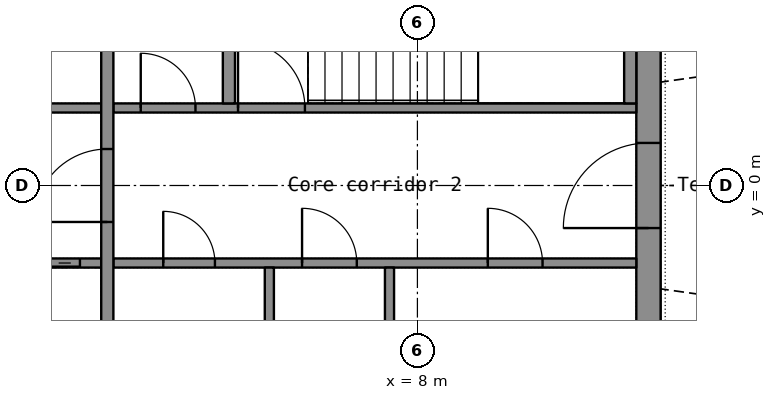
"""IFC4 building model, lengths in metres.
Left out: names, types, materials, properties, quantities, classifications, styles, units other than length and angle.
Written with IfcOpenShell. Run it as: python <this file> out.ifc"""

import sys

from ifc_helpers import new_model, si_unit, direction, frame, frame_2d, origin, place, context, subcontext, project, spatial, rectangle, extrude, element, fill, save


model = new_model("IFC4")
c1 = context("Model", 3, precision=1e-05, world=origin(), true_north=direction((0.0, 1.0)))
c2 = subcontext(c1, "Body", "Model", "MODEL_VIEW")
j1 = project(units=[si_unit("LENGTHUNIT", "METRE"), si_unit("PLANEANGLEUNIT", "RADIAN")], contexts=[c1])
p1 = place(None, origin())
s1 = spatial("IfcSite", under=j1, at=p1, CompositionType="ELEMENT")
p2 = place(p1, origin())
s2 = spatial("IfcBuilding", under=s1, at=p2, CompositionType="ELEMENT")
p3 = place(p2, frame((0.0, 0.0, 246.7)))
s3 = spatial("IfcBuildingStorey", under=s2, at=p3, CompositionType="ELEMENT", Elevation=246.7)
p4 = place(p3, frame((11.8, -7.2, 0.0), z_axis=(0.0, 0.0, 1.0), x_axis=(0.0, 1.0, 0.0)))
e1 = element("IfcWall", 1, at=p4, inside=s3, PredefinedType="SHEAR", context=c2, shape_type="SweptSolid", body=[
    extrude(rectangle(XDim=14.4, YDim=0.4, at=frame_2d((7.2, 0.0))), origin(), (0.0, 0.0, 1.0), 3.3),
])
p5 = place(p4, frame((6.5, 0.0, 0.0)))
e2 = element("IfcOpeningElement", 2, at=p5, cuts=e1, PredefinedType="OPENING", context=c2, shape_type="SweptSolid", body=[
    extrude(rectangle(XDim=1.4, YDim=2.2, at=frame_2d((0.7, 1.1))), frame((0.0, 0.21, 0.0), z_axis=(0.0, -1.0, 0.0), x_axis=(1.0, 0.0, 0.0)), (0.0, 0.0, 1.0), 0.42),
])
p6 = place(p3, frame((-2.8, -1.275, 0.0), z_axis=(0.0, 0.0, 1.0), x_axis=(1.0, 0.0, 0.0)))
e3 = element("IfcWall", 3, at=p6, inside=s3, PredefinedType="SHEAR", context=c2, shape_type="SweptSolid", body=[
    extrude(rectangle(XDim=5.6, YDim=0.15, at=frame_2d((2.8, 0.0))), origin(), (0.0, 0.0, 1.0), 3.3),
])
p7 = place(p6, frame((4.15, 0.0, 0.0)))
e4 = element("IfcOpeningElement", 4, at=p7, cuts=e3, PredefinedType="OPENING", context=c2, shape_type="SweptSolid", body=[
    extrude(rectangle(XDim=1.1, YDim=2.2, at=frame_2d((0.55, 1.1))), frame((0.0, 0.085, 0.0), z_axis=(0.0, -1.0, 0.0), x_axis=(1.0, 0.0, 0.0)), (0.0, 0.0, 1.0), 0.17),
])
p8 = place(p6, frame((1.35, 0.0, 0.0)))
e5 = element("IfcOpeningElement", 5, at=p8, cuts=e3, PredefinedType="OPENING", context=c2, shape_type="SweptSolid", body=[
    extrude(rectangle(XDim=0.9, YDim=2.1, at=frame_2d((0.45, 1.05))), frame((0.0, 0.085, 0.0), z_axis=(0.0, -1.0, 0.0), x_axis=(1.0, 0.0, 0.0)), (0.0, 0.0, 1.0), 0.17),
])
p9 = place(p3, frame((3.0, -1.275, 0.0), z_axis=(0.0, 0.0, 1.0), x_axis=(1.0, 0.0, 0.0)))
e6 = element("IfcWall", 6, at=p9, inside=s3, PredefinedType="PARTITIONING", context=c2, shape_type="SweptSolid", body=[
    extrude(rectangle(XDim=8.6, YDim=0.15, at=frame_2d((4.3, 0.0))), origin(), (0.0, 0.0, 1.0), 3.3),
])
p10 = place(p9, frame((0.82, 0.0, 0.0)))
e7 = element("IfcOpeningElement", 7, at=p10, cuts=e6, PredefinedType="OPENING", context=c2, shape_type="SweptSolid", body=[
    extrude(rectangle(XDim=0.85, YDim=2.1, at=frame_2d((0.425, 1.05))), frame((0.0, 0.085, 0.0), z_axis=(0.0, -1.0, 0.0), x_axis=(1.0, 0.0, 0.0)), (0.0, 0.0, 1.0), 0.17),
])
p11 = place(p9, frame((3.103, 0.0, 0.0)))
e8 = element("IfcOpeningElement", 8, at=p11, cuts=e6, PredefinedType="OPENING", context=c2, shape_type="SweptSolid", body=[
    extrude(rectangle(XDim=0.9, YDim=2.1, at=frame_2d((0.45, 1.05))), frame((0.0, 0.085, 0.0), z_axis=(0.0, -1.0, 0.0), x_axis=(1.0, 0.0, 0.0)), (0.0, 0.0, 1.0), 0.17),
])
p12 = place(p9, frame((6.158, 0.0, 0.0)))
e9 = element("IfcOpeningElement", 9, at=p12, cuts=e6, PredefinedType="OPENING", context=c2, shape_type="SweptSolid", body=[
    extrude(rectangle(XDim=0.9, YDim=2.1, at=frame_2d((0.45, 1.05))), frame((0.0, 0.085, 0.0), z_axis=(0.0, -1.0, 0.0), x_axis=(1.0, 0.0, 0.0)), (0.0, 0.0, 1.0), 0.17),
])
p13 = place(p3, frame((-2.8, 1.275, 0.0), z_axis=(0.0, 0.0, 1.0), x_axis=(1.0, 0.0, 0.0)))
e10 = element("IfcWall", 10, at=p13, inside=s3, PredefinedType="SHEAR", context=c2, shape_type="SweptSolid", body=[
    extrude(rectangle(XDim=5.6, YDim=0.15, at=frame_2d((2.8, 0.0))), origin(), (0.0, 0.0, 1.0), 3.3),
])
p14 = place(p13, frame((0.35, 0.0, 0.0)))
e11 = element("IfcOpeningElement", 11, at=p14, cuts=e10, PredefinedType="OPENING", context=c2, shape_type="SweptSolid", body=[
    extrude(rectangle(XDim=1.1, YDim=2.2, at=frame_2d((0.55, 1.1))), frame((0.0, 0.085, 0.0), z_axis=(0.0, -1.0, 0.0), x_axis=(1.0, 0.0, 0.0)), (0.0, 0.0, 1.0), 0.17),
])
p15 = place(p13, frame((3.35, 0.0, 0.0)))
e12 = element("IfcOpeningElement", 12, at=p15, cuts=e10, PredefinedType="OPENING", context=c2, shape_type="SweptSolid", body=[
    extrude(rectangle(XDim=0.9, YDim=2.1, at=frame_2d((0.45, 1.05))), frame((0.0, 0.085, 0.0), z_axis=(0.0, -1.0, 0.0), x_axis=(1.0, 0.0, 0.0)), (0.0, 0.0, 1.0), 0.17),
])
p16 = place(p3, frame((3.0, 1.275, 0.0), z_axis=(0.0, 0.0, 1.0), x_axis=(1.0, 0.0, 0.0)))
e13 = element("IfcWall", 13, at=p16, inside=s3, PredefinedType="SHEAR", context=c2, shape_type="SweptSolid", body=[
    extrude(rectangle(XDim=8.6, YDim=0.15, at=frame_2d((4.3, 0.0))), origin(), (0.0, 0.0, 1.0), 3.3),
])
p17 = place(p16, frame((2.05, 0.0, 0.0)))
e14 = element("IfcOpeningElement", 14, at=p17, cuts=e13, PredefinedType="OPENING", context=c2, shape_type="SweptSolid", body=[
    extrude(rectangle(XDim=1.1, YDim=2.15, at=frame_2d((0.55, 1.075))), frame((0.0, 0.085, 0.0), z_axis=(0.0, -1.0, 0.0), x_axis=(1.0, 0.0, 0.0)), (0.0, 0.0, 1.0), 0.17),
])
p18 = place(p16, frame((0.45, 0.0, 0.0)))
e15 = element("IfcOpeningElement", 15, at=p18, cuts=e13, PredefinedType="OPENING", context=c2, shape_type="SweptSolid", body=[
    extrude(rectangle(XDim=0.9, YDim=2.1, at=frame_2d((0.45, 1.05))), frame((0.0, 0.085, 0.0), z_axis=(0.0, -1.0, 0.0), x_axis=(1.0, 0.0, 0.0)), (0.0, 0.0, 1.0), 0.17),
])
p19 = place(p3, frame((2.9, -3.7, 0.0), z_axis=(0.0, 0.0, 1.0), x_axis=(0.0, 1.0, 0.0)))
e16 = element("IfcWall", 16, at=p19, inside=s3, PredefinedType="SHEAR", context=c2, shape_type="SweptSolid", body=[
    extrude(rectangle(XDim=7.4, YDim=0.2, at=frame_2d((3.7, 0.0))), origin(), (0.0, 0.0, 1.0), 3.3),
])
p20 = place(p19, frame((3.1, 0.0, 0.0)))
e17 = element("IfcOpeningElement", 17, at=p20, cuts=e16, PredefinedType="OPENING", context=c2, shape_type="SweptSolid", body=[
    extrude(rectangle(XDim=1.2, YDim=2.2, at=frame_2d((0.6, 1.1))), frame((0.0, 0.11, 0.0), z_axis=(0.0, -1.0, 0.0), x_axis=(1.0, 0.0, 0.0)), (0.0, 0.0, 1.0), 0.22),
])
for number, where, z_axis, x_axis in (
    (18, (11.5, 1.35, 0.0), (0.0, 0.0, 1.0), (0.0, 1.0, 0.0)),
    (19, (4.9, 1.35, 0.0), (0.0, 0.0, 1.0), (0.0, 1.0, 0.0)),
):
    element("IfcWall", number, at=place(p3, frame(where, z_axis=z_axis, x_axis=x_axis)), inside=s3, PredefinedType="SHEAR", context=c2, shape_type="SweptSolid", body=[
        extrude(rectangle(XDim=2.35, YDim=0.2, at=frame_2d((1.175, 0.0))), origin(), (0.0, 0.0, 1.0), 3.3),
    ])
for number, where, z_axis, x_axis in (
    (20, (5.565, -3.7, 0.0), (0.0, 0.0, 1.0), (0.0, 1.0, 0.0)),
    (21, (7.541, -3.7, 0.0), (0.0, 0.0, 1.0), (0.0, 1.0, 0.0)),
):
    element("IfcWall", number, at=place(p3, frame(where, z_axis=z_axis, x_axis=x_axis)), inside=s3, PredefinedType="PARTITIONING", context=c2, shape_type="SweptSolid", body=[
        extrude(rectangle(XDim=2.35, YDim=0.15, at=frame_2d((1.175, 0.0))), origin(), (0.0, 0.0, 1.0), 3.3),
    ])
p21 = place(p5, origin())
e22 = element("IfcDoor", 22, at=p21, inside=s3, OperationType="DOUBLE_DOOR_SINGLE_SWING", PredefinedType="DOOR", context=c2, shape_type="SweptSolid", body=[
    extrude(rectangle(XDim=1.4, YDim=2.2, at=frame_2d((0.7, 1.1))), frame((0.0, 0.025, 0.0), z_axis=(0.0, -1.0, 0.0), x_axis=(1.0, 0.0, 0.0)), (0.0, 0.0, 1.0), 0.05),
])
fill(e2, e22)
p22 = place(p20, origin())
e23 = element("IfcDoor", 23, at=p22, inside=s3, OperationType="SINGLE_SWING_LEFT", PredefinedType="DOOR", context=c2, shape_type="SweptSolid", body=[
    extrude(rectangle(XDim=1.2, YDim=2.2, at=frame_2d((0.6, 1.1))), frame((0.0, 0.025, 0.0), z_axis=(0.0, -1.0, 0.0), x_axis=(1.0, 0.0, 0.0)), (0.0, 0.0, 1.0), 0.05),
])
fill(e17, e23)
p23 = place(p7, origin())
e24 = element("IfcDoor", 24, at=p23, inside=s3, OperationType="DOUBLE_DOOR_SLIDING", PredefinedType="DOOR", context=c2, shape_type="SweptSolid", body=[
    extrude(rectangle(XDim=1.1, YDim=2.2, at=frame_2d((0.55, 1.1))), frame((0.0, 0.025, 0.0), z_axis=(0.0, -1.0, 0.0), x_axis=(1.0, 0.0, 0.0)), (0.0, 0.0, 1.0), 0.05),
])
fill(e4, e24)
p24 = place(p17, origin())
e25 = element("IfcDoor", 25, at=p24, inside=s3, OperationType="SINGLE_SWING_LEFT", PredefinedType="DOOR", context=c2, shape_type="SweptSolid", body=[
    extrude(rectangle(XDim=1.1, YDim=2.15, at=frame_2d((0.55, 1.075))), frame((0.0, 0.025, 0.0), z_axis=(0.0, -1.0, 0.0), x_axis=(1.0, 0.0, 0.0)), (0.0, 0.0, 1.0), 0.05),
])
fill(e14, e25)
p25 = place(p10, origin())
e26 = element("IfcDoor", 26, at=p25, inside=s3, OperationType="SINGLE_SWING_LEFT", PredefinedType="DOOR", context=c2, shape_type="SweptSolid", body=[
    extrude(rectangle(XDim=0.85, YDim=2.1, at=frame_2d((0.425, 1.05))), frame((0.0, 0.025, 0.0), z_axis=(0.0, -1.0, 0.0), x_axis=(1.0, 0.0, 0.0)), (0.0, 0.0, 1.0), 0.05),
])
fill(e7, e26)
p26 = place(p11, origin())
e27 = element("IfcDoor", 27, at=p26, inside=s3, OperationType="SINGLE_SWING_LEFT", PredefinedType="DOOR", context=c2, shape_type="SweptSolid", body=[
    extrude(rectangle(XDim=0.9, YDim=2.1, at=frame_2d((0.45, 1.05))), frame((0.0, 0.025, 0.0), z_axis=(0.0, -1.0, 0.0), x_axis=(1.0, 0.0, 0.0)), (0.0, 0.0, 1.0), 0.05),
])
fill(e8, e27)
p27 = place(p12, origin())
e28 = element("IfcDoor", 28, at=p27, inside=s3, OperationType="SINGLE_SWING_LEFT", PredefinedType="DOOR", context=c2, shape_type="SweptSolid", body=[
    extrude(rectangle(XDim=0.9, YDim=2.1, at=frame_2d((0.45, 1.05))), frame((0.0, 0.025, 0.0), z_axis=(0.0, -1.0, 0.0), x_axis=(1.0, 0.0, 0.0)), (0.0, 0.0, 1.0), 0.05),
])
fill(e9, e28)
p28 = place(p18, origin())
e29 = element("IfcDoor", 29, at=p28, inside=s3, OperationType="SINGLE_SWING_LEFT", PredefinedType="DOOR", context=c2, shape_type="SweptSolid", body=[
    extrude(rectangle(XDim=0.9, YDim=2.1, at=frame_2d((0.45, 1.05))), frame((0.0, 0.025, 0.0), z_axis=(0.0, -1.0, 0.0), x_axis=(1.0, 0.0, 0.0)), (0.0, 0.0, 1.0), 0.05),
])
fill(e15, e29)
save(model, sys.argv[1])
